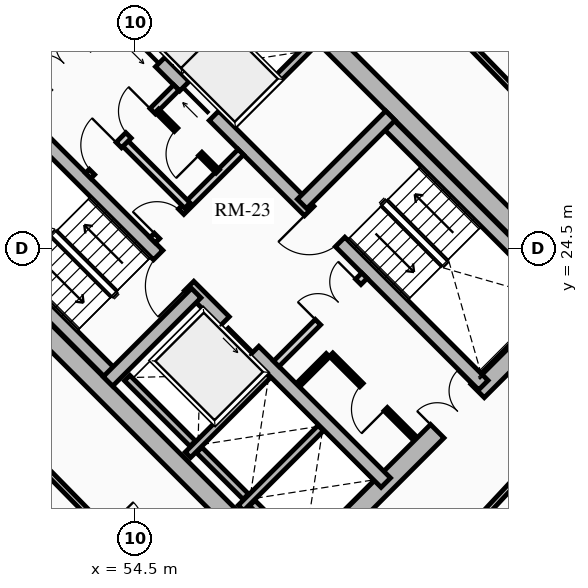
"""IFC4 building model, lengths in metres.
Left out: names, types, materials, properties, quantities, classifications, styles, units other than length and angle.
Written with IfcOpenShell. Run it as: python <this file> out.ifc"""

import sys

from ifc_helpers import new_model, si_unit, direction, frame, frame_2d, origin, place, context, subcontext, project, spatial, rectangle, extrude, source, transform, mapped, element, fill, save


model = new_model("IFC4")
c1 = context("Model", 3, precision=1e-05, world=origin(), true_north=direction((0.0, 1.0)))
c2 = subcontext(c1, "Body", "Model", "MODEL_VIEW")
j1 = project(units=[si_unit("LENGTHUNIT", "METRE"), si_unit("PLANEANGLEUNIT", "RADIAN")], contexts=[c1])
p1 = place(None, origin())
s1 = spatial("IfcSite", under=j1, at=p1, CompositionType="ELEMENT")
p2 = place(p1, origin())
s2 = spatial("IfcBuilding", under=s1, at=p2, CompositionType="ELEMENT")
p3 = place(p2, frame((0.0, 0.0, 62.74)))
s3 = spatial("IfcBuildingStorey", under=s2, at=p3, CompositionType="ELEMENT", Elevation=62.74)
for number, where, z_axis, x_axis in (
    (1, (58.773, 15.661, 0.0), (0.0, 0.0, 1.0), (-0.707, 0.707, 0.0)),
    (2, (66.339, 23.227, 0.0), (0.0, 0.0, 1.0), (-0.707, 0.707, 0.0)),
):
    element("IfcWall", number, at=place(p3, frame(where, z_axis=z_axis, x_axis=x_axis)), inside=s3, PredefinedType="SHEAR", context=c2, shape_type="SweptSolid", body=[
        extrude(rectangle(XDim=14.3, YDim=0.5, at=frame_2d((7.15, 0.0))), origin(), (0.0, 0.0, 1.0), 2.91),
    ])
p4 = place(p3, frame((58.596, 15.838, 0.0), z_axis=(0.0, 0.0, 1.0), x_axis=(0.707106781187, 0.707106781187, 0.0)))
e3 = element("IfcWall", 3, at=p4, inside=s3, PredefinedType="SHEAR", context=c2, shape_type="SweptSolid", body=[
    extrude(rectangle(XDim=10.7, YDim=0.5, at=frame_2d((5.35, 0.0))), origin(), (0.0, 0.0, 1.0), 2.91),
])
m1 = source(origin(), c2, "Body", "SweptSolid", [
    extrude(rectangle(XDim=1.5, YDim=2.02, at=frame_2d((0.75, 1.01))), frame((0.0, 0.26, 0.0), z_axis=(0.0, -1.0, 0.0), x_axis=(1.0, 0.0, 0.0)), (0.0, 0.0, 1.0), 0.52),
])
p5 = place(p4, frame((5.45, 0.0, 0.0)))
e4 = element("IfcOpeningElement", 4, at=p5, cuts=e3, PredefinedType="OPENING", context=c2, shape_type="MappedRepresentation", body=[
    mapped(m1, transform((0.0, 0.0, 0.0), x_axis=(1.0, 0.0, 0.0), y_axis=(0.0, 1.0, 0.0), z_axis=(0.0, 0.0, 1.0), scale=1.0)),
])
p6 = place(p3, frame((48.838, 25.596, 0.0), z_axis=(0.0, 0.0, 1.0), x_axis=(0.707106781187, 0.707106781187, 0.0)))
e5 = element("IfcWall", 5, at=p6, inside=s3, PredefinedType="SHEAR", context=c2, shape_type="SweptSolid", body=[
    extrude(rectangle(XDim=10.7, YDim=0.5, at=frame_2d((5.35, 0.0))), origin(), (0.0, 0.0, 1.0), 2.91),
])
p7 = place(p6, frame((4.6, 0.0, 0.0)))
e6 = element("IfcOpeningElement", 6, at=p7, cuts=e5, PredefinedType="OPENING", context=c2, shape_type="MappedRepresentation", body=[
    mapped(m1, transform((0.0, 0.0, 0.0), x_axis=(1.0, 0.0, 0.0), y_axis=(0.0, 1.0, 0.0), z_axis=(0.0, 0.0, 1.0), scale=1.0)),
])
p8 = place(p3, frame((61.096, 18.338, 0.0), z_axis=(0.0, 0.0, 1.0), x_axis=(-0.707106781187, 0.707106781187, 0.0)))
e7 = element("IfcWall", 7, at=p8, inside=s3, PredefinedType="SHEAR", context=c2, shape_type="SweptSolid", body=[
    extrude(rectangle(XDim=13.8, YDim=0.35, at=frame_2d((6.9, 0.0))), origin(), (0.0, 0.0, 1.0), 2.91),
])
m2 = source(origin(), c2, "Body", "SweptSolid", [
    extrude(rectangle(XDim=1.1, YDim=2.015, at=frame_2d((0.55, 1.007))), frame((0.0, 0.185, 0.0), z_axis=(0.0, -1.0, 0.0), x_axis=(1.0, 0.0, 0.0)), (0.0, 0.0, 1.0), 0.37),
])
p9 = place(p8, frame((4.9, 0.0, 0.0)))
e8 = element("IfcOpeningElement", 8, at=p9, cuts=e7, PredefinedType="OPENING", context=c2, shape_type="MappedRepresentation", body=[
    mapped(m2, transform((0.0, 0.0, 0.0), x_axis=(1.0, 0.0, 0.0), y_axis=(0.0, 1.0, 0.0), z_axis=(0.0, 0.0, 1.0), scale=1.0)),
])
m3 = source(origin(), c2, "Body", "SweptSolid", [
    extrude(rectangle(XDim=1.15, YDim=2.02, at=frame_2d((0.575, 1.01))), frame((0.0, 0.185, 0.0), z_axis=(0.0, -1.0, 0.0), x_axis=(1.0, 0.0, 0.0)), (0.0, 0.0, 1.0), 0.37),
])
p10 = place(p8, frame((7.32, 0.0, 0.0)))
e9 = element("IfcOpeningElement", 9, at=p10, cuts=e7, PredefinedType="OPENING", context=c2, shape_type="MappedRepresentation", body=[
    mapped(m3, transform((0.0, 0.0, 0.0), x_axis=(1.0, 0.0, 0.0), y_axis=(0.0, 1.0, 0.0), z_axis=(0.0, 0.0, 1.0), scale=1.0)),
])
p11 = place(p3, frame((63.662, 20.904, 0.0), z_axis=(0.0, 0.0, 1.0), x_axis=(-0.707106781187, 0.707106781187, 0.0)))
e10 = element("IfcWall", 10, at=p11, inside=s3, PredefinedType="SHEAR", context=c2, shape_type="SweptSolid", body=[
    extrude(rectangle(XDim=13.8, YDim=0.35, at=frame_2d((6.9, 0.0))), origin(), (0.0, 0.0, 1.0), 2.91),
])
p12 = place(p11, frame((10.025, 0.0, 0.0)))
e11 = element("IfcOpeningElement", 11, at=p12, cuts=e10, PredefinedType="OPENING", context=c2, shape_type="MappedRepresentation", body=[
    mapped(m2, transform((0.0, 0.0, 0.0), x_axis=(1.0, 0.0, 0.0), y_axis=(0.0, 1.0, 0.0), z_axis=(0.0, 0.0, 1.0), scale=1.0)),
])
p13 = place(p11, frame((12.025, 0.0, 0.0)))
e12 = element("IfcOpeningElement", 12, at=p13, cuts=e10, PredefinedType="OPENING", context=c2, shape_type="MappedRepresentation", body=[
    mapped(m2, transform((0.0, 0.0, 0.0), x_axis=(1.0, 0.0, 0.0), y_axis=(0.0, 1.0, 0.0), z_axis=(0.0, 0.0, 1.0), scale=1.0)),
])
p14 = place(p11, frame((5.33, 0.0, 0.0)))
e13 = element("IfcOpeningElement", 13, at=p14, cuts=e10, PredefinedType="OPENING", context=c2, shape_type="MappedRepresentation", body=[
    mapped(m3, transform((0.0, 0.0, 0.0), x_axis=(1.0, 0.0, 0.0), y_axis=(0.0, 1.0, 0.0), z_axis=(0.0, 0.0, 1.0), scale=1.0)),
])
p15 = place(p3, frame((53.922, 21.141, 0.0), z_axis=(0.0, 0.0, 1.0), x_axis=(-0.707106781187, 0.707106781187, 0.0)))
e14 = element("IfcWall", 14, at=p15, inside=s3, PredefinedType="SHEAR", context=c2, shape_type="SweptSolid", body=[
    extrude(rectangle(XDim=6.745, YDim=0.35, at=frame_2d((3.373, 0.0))), origin(), (0.0, 0.0, 1.0), 2.91),
])
p16 = place(p3, frame((53.784, 21.003, 0.0), z_axis=(0.0, 0.0, 1.0), x_axis=(0.707106781187, 0.707106781187, 0.0)))
e15 = element("IfcWall", 15, at=p16, inside=s3, PredefinedType="SHEAR", context=c2, shape_type="SweptSolid", body=[
    extrude(rectangle(XDim=3.285, YDim=0.35, at=frame_2d((1.643, 0.0))), origin(), (0.0, 0.0, 1.0), 2.91),
])
p17 = place(p3, frame((65.847, 23.089, 0.0), z_axis=(0.0, 0.0, 1.0), x_axis=(-0.707106781187, 0.707106781187, 0.0)))
e16 = element("IfcWall", 16, at=p17, inside=s3, PredefinedType="SHEAR", context=c2, shape_type="SweptSolid", body=[
    extrude(rectangle(XDim=6.745, YDim=0.35, at=frame_2d((3.373, 0.0))), origin(), (0.0, 0.0, 1.0), 2.91),
])
p18 = place(p3, frame((58.893, 25.674, 0.0), z_axis=(0.0, 0.0, 1.0), x_axis=(0.707106781187, 0.707106781187, 0.0)))
e17 = element("IfcWall", 17, at=p18, inside=s3, PredefinedType="SHEAR", context=c2, shape_type="SweptSolid", body=[
    extrude(rectangle(XDim=3.285, YDim=0.35, at=frame_2d((1.643, 0.0))), origin(), (0.0, 0.0, 1.0), 2.91),
])
p19 = place(p3, frame((55.888, 19.069, 0.0), z_axis=(0.0, 0.0, 1.0), x_axis=(0.707106781187, 0.707106781187, 0.0)))
e18 = element("IfcWall", 18, at=p19, inside=s3, PredefinedType="SHEAR", context=c2, shape_type="SweptSolid", body=[
    extrude(rectangle(XDim=2.97, YDim=0.2, at=frame_2d((1.485, 0.0))), origin(), (0.0, 0.0, 1.0), 2.91),
])
p20 = place(p3, frame((56.015, 19.366, 0.0), z_axis=(0.0, 0.0, 1.0), x_axis=(-0.707106781187, 0.707106781187, 0.0)))
e19 = element("IfcWall", 19, at=p20, inside=s3, PredefinedType="SHEAR", context=c2, shape_type="SweptSolid", body=[
    extrude(rectangle(XDim=2.44, YDim=0.2, at=frame_2d((1.22, 0.0))), origin(), (0.0, 0.0, 1.0), 2.91),
])
p21 = place(p3, frame((57.284, 17.673, 0.0), z_axis=(0.0, 0.0, 1.0), x_axis=(0.707147878904, 0.70706568108, 0.0)))
e20 = element("IfcWall", 20, at=p21, inside=s3, PredefinedType="SHEAR", context=c2, shape_type="SweptSolid", body=[
    extrude(rectangle(XDim=2.97, YDim=0.2, at=frame_2d((1.485, 0.0))), origin(), (0.0, 0.0, 1.0), 2.91),
])
p22 = place(p3, frame((57.412, 17.97, 0.0), z_axis=(0.0, 0.0, 1.0), x_axis=(-0.707106781187, 0.707106781187, 0.0)))
e21 = element("IfcWall", 21, at=p22, inside=s3, PredefinedType="SHEAR", context=c2, shape_type="SweptSolid", body=[
    extrude(rectangle(XDim=1.735, YDim=0.2, at=frame_2d((0.867, 0.0))), origin(), (0.0, 0.0, 1.0), 2.91),
])
p23 = place(p3, frame((58.737, 16.644, 0.0), z_axis=(0.0, 0.0, 1.0), x_axis=(-0.707032117043, 0.707181437447, 0.0)))
e22 = element("IfcWall", 22, at=p23, inside=s3, PredefinedType="SHEAR", context=c2, shape_type="SweptSolid", body=[
    extrude(rectangle(XDim=1.635, YDim=0.2, at=frame_2d((0.817, 0.0))), origin(), (0.0, 0.0, 1.0), 2.91),
])
p24 = place(p3, frame((57.062, 27.781, 0.0), z_axis=(0.0, 0.0, 1.0), x_axis=(0.707106781187, 0.707106781187, 0.0)))
e23 = element("IfcWall", 23, at=p24, inside=s3, PredefinedType="SHEAR", context=c2, shape_type="SweptSolid", body=[
    extrude(rectangle(XDim=2.97, YDim=0.2, at=frame_2d((1.485, 0.0))), origin(), (0.0, 0.0, 1.0), 2.91),
])
p25 = place(p3, frame((55.615, 29.227, 0.0), z_axis=(0.0, 0.0, 1.0), x_axis=(0.707147878904, 0.70706568108, 0.0)))
e24 = element("IfcWall", 24, at=p25, inside=s3, PredefinedType="SHEAR", context=c2, shape_type="SweptSolid", body=[
    extrude(rectangle(XDim=2.97, YDim=0.2, at=frame_2d((1.485, 0.0))), origin(), (0.0, 0.0, 1.0), 2.91),
])
p26 = place(p3, frame((58.214, 21.467, 0.0), z_axis=(0.0, 0.0, 1.0), x_axis=(0.707106781187, 0.707106781187, 0.0)))
e25 = element("IfcWall", 25, at=p26, inside=s3, PredefinedType="PARTITIONING", context=c2, shape_type="SweptSolid", body=[
    extrude(rectangle(XDim=3.28, YDim=0.2, at=frame_2d((1.64, 0.0))), origin(), (0.0, 0.0, 1.0), 2.555),
])
m4 = source(origin(), c2, "Body", "SweptSolid", [
    extrude(rectangle(XDim=1.5, YDim=2.02, at=frame_2d((0.75, 1.01))), frame((0.0, 0.11, 0.0), z_axis=(0.0, -1.0, 0.0), x_axis=(1.0, 0.0, 0.0)), (0.0, 0.0, 1.0), 0.22),
])
p27 = place(p26, frame((1.55, 0.0, 0.0)))
e26 = element("IfcOpeningElement", 26, at=p27, cuts=e25, PredefinedType="OPENING", context=c2, shape_type="MappedRepresentation", body=[
    mapped(m4, transform((0.0, 0.0, 0.0), x_axis=(1.0, 0.0, 0.0), y_axis=(0.0, 1.0, 0.0), z_axis=(0.0, 0.0, 1.0), scale=1.0)),
])
p28 = place(p3, frame((54.961, 24.719, 0.0), z_axis=(0.0, 0.0, 1.0), x_axis=(0.707106781187, 0.707106781187, 0.0)))
e27 = element("IfcWall", 27, at=p28, inside=s3, PredefinedType="PARTITIONING", context=c2, shape_type="SweptSolid", body=[
    extrude(rectangle(XDim=3.28, YDim=0.2, at=frame_2d((1.64, 0.0))), origin(), (0.0, 0.0, 1.0), 2.555),
])
m5 = source(origin(), c2, "Body", "SweptSolid", [
    extrude(rectangle(XDim=0.9, YDim=2.005, at=frame_2d((0.45, 1.002))), frame((0.0, 0.11, 0.0), z_axis=(0.0, -1.0, 0.0), x_axis=(1.0, 0.0, 0.0)), (0.0, 0.0, 1.0), 0.22),
])
p29 = place(p28, frame((0.16, 0.0, 0.0)))
e28 = element("IfcOpeningElement", 28, at=p29, cuts=e27, PredefinedType="OPENING", context=c2, shape_type="MappedRepresentation", body=[
    mapped(m5, transform((0.0, 0.0, 0.0), x_axis=(1.0, 0.0, 0.0), y_axis=(0.0, 1.0, 0.0), z_axis=(0.0, 0.0, 1.0), scale=1.0)),
])
p30 = place(p3, frame((55.874, 25.631, 0.0), z_axis=(0.0, 0.0, 1.0), x_axis=(-0.707157639372, 0.707055919343, 0.0)))
e29 = element("IfcWall", 29, at=p30, inside=s3, PredefinedType="PARTITIONING", context=c2, shape_type="SweptSolid", body=[
    extrude(rectangle(XDim=2.4, YDim=0.2, at=frame_2d((1.2, 0.0))), origin(), (0.0, 0.0, 1.0), 2.555),
])
p31 = place(p3, frame((53.264, 26.416, 0.0), z_axis=(0.0, 0.0, 1.0), x_axis=(0.707106781187, 0.707106781187, 0.0)))
e30 = element("IfcWall", 30, at=p31, inside=s3, PredefinedType="PARTITIONING", context=c2, shape_type="SweptSolid", body=[
    extrude(rectangle(XDim=3.28, YDim=0.2, at=frame_2d((1.64, 0.0))), origin(), (0.0, 0.0, 1.0), 2.555),
])
m6 = source(origin(), c2, "Body", "SweptSolid", [
    extrude(rectangle(XDim=1.0, YDim=2.015, at=frame_2d((0.5, 1.007))), frame((0.0, 0.11, 0.0), z_axis=(0.0, -1.0, 0.0), x_axis=(1.0, 0.0, 0.0)), (0.0, 0.0, 1.0), 0.22),
])
p32 = place(p31, frame((0.14, 0.0, 0.0)))
e31 = element("IfcOpeningElement", 31, at=p32, cuts=e30, PredefinedType="OPENING", context=c2, shape_type="MappedRepresentation", body=[
    mapped(m6, transform((0.0, 0.0, 0.0), x_axis=(1.0, 0.0, 0.0), y_axis=(0.0, 1.0, 0.0), z_axis=(0.0, 0.0, 1.0), scale=1.0)),
])
p33 = place(p31, frame((1.5, 0.0, 0.0)))
e32 = element("IfcOpeningElement", 32, at=p33, cuts=e30, PredefinedType="OPENING", context=c2, shape_type="MappedRepresentation", body=[
    mapped(m5, transform((0.0, 0.0, 0.0), x_axis=(1.0, 0.0, 0.0), y_axis=(0.0, 1.0, 0.0), z_axis=(0.0, 0.0, 1.0), scale=1.0)),
])
p34 = place(p3, frame((61.835, 19.529, 0.0), z_axis=(0.0, 0.0, 1.0), x_axis=(-0.707146413884, 0.707067146267, 0.0)))
e33 = element("IfcWall", 33, at=p34, inside=s3, PredefinedType="PARTITIONING", context=c2, shape_type="SweptSolid", body=[
    extrude(rectangle(XDim=3.08, YDim=0.125, at=frame_2d((1.54, 0.0))), origin(), (0.0, 0.0, 1.0), 2.555),
])
m7 = source(origin(), c2, "Body", "SweptSolid", [
    extrude(rectangle(XDim=0.9, YDim=2.005, at=frame_2d((0.45, 1.002))), frame((0.0, 0.073, 0.0), z_axis=(0.0, -1.0, 0.0), x_axis=(1.0, 0.0, 0.0)), (0.0, 0.0, 1.0), 0.145),
])
p35 = place(p34, frame((1.05, 0.0, 0.0)))
e34 = element("IfcOpeningElement", 34, at=p35, cuts=e33, PredefinedType="OPENING", context=c2, shape_type="MappedRepresentation", body=[
    mapped(m7, transform((0.0, 0.0, 0.0), x_axis=(1.0, 0.0, 0.0), y_axis=(0.0, 1.0, 0.0), z_axis=(0.0, 0.0, 1.0), scale=1.0)),
])
p36 = place(p3, frame((58.794, 20.915, 0.0), z_axis=(0.0, 0.0, 1.0), x_axis=(0.707106781187, 0.707106781187, 0.0)))
e35 = element("IfcWall", 35, at=p36, inside=s3, PredefinedType="PARTITIONING", context=c2, shape_type="SweptSolid", body=[
    extrude(rectangle(XDim=1.1, YDim=0.125, at=frame_2d((0.55, 0.0))), origin(), (0.0, 0.0, 1.0), 2.555),
])
p37 = place(p3, frame((56.673, 26.529, 0.0), z_axis=(0.0, 0.0, 1.0), x_axis=(-0.707052764397, 0.70716079385, 0.0)))
e36 = element("IfcWall", 36, at=p37, inside=s3, PredefinedType="PARTITIONING", context=c2, shape_type="SweptSolid", body=[
    extrude(rectangle(XDim=2.26, YDim=0.125, at=frame_2d((1.13, 0.0))), origin(), (0.0, 0.0, 1.0), 2.555),
])
p38 = place(p37, frame((0.65, 0.0, 0.0)))
e37 = element("IfcOpeningElement", 37, at=p38, cuts=e36, PredefinedType="OPENING", context=c2, shape_type="MappedRepresentation", body=[
    mapped(m7, transform((0.0, 0.0, 0.0), x_axis=(1.0, 0.0, 0.0), y_axis=(0.0, 1.0, 0.0), z_axis=(0.0, 0.0, 1.0), scale=1.0)),
])
p39 = place(p3, frame((51.914, 18.914, 0.0), z_axis=(0.0, 0.0, 1.0), x_axis=(0.699999313799, -0.714143515465, 0.0)))
e38 = element("IfcWall", 38, at=p39, inside=s3, PredefinedType="PARTITIONING", context=c2, shape_type="SweptSolid", body=[
    extrude(rectangle(XDim=6.162, YDim=0.15, at=frame_2d((3.081, 0.0))), origin(), (0.0, 0.0, 1.0), 2.079),
])
m8 = source(origin(), c2, "Body", "SweptSolid", [
    extrude(rectangle(XDim=1.05, YDim=2.015, at=frame_2d((0.525, 1.007))), frame((0.0, 0.085, 0.0), z_axis=(0.0, -1.0, 0.0), x_axis=(1.0, 0.0, 0.0)), (0.0, 0.0, 1.0), 0.17),
])
p40 = place(p39, frame((2.556, 0.0, 0.0)))
e39 = element("IfcOpeningElement", 39, at=p40, cuts=e38, PredefinedType="OPENING", context=c2, shape_type="MappedRepresentation", body=[
    mapped(m8, transform((0.0, 0.0, 0.0), x_axis=(1.0, 0.0, 0.0), y_axis=(0.0, 1.0, 0.0), z_axis=(0.0, 0.0, 1.0), scale=1.0)),
])
p41 = place(p3, frame((62.903, 16.667, 0.0), z_axis=(0.0, 0.0, 1.0), x_axis=(0.682371947497, 0.731005147225, 0.0)))
e40 = element("IfcWall", 40, at=p41, inside=s3, PredefinedType="PARTITIONING", context=c2, shape_type="SweptSolid", body=[
    extrude(rectangle(XDim=6.642, YDim=0.15, at=frame_2d((3.321, 0.0))), origin(), (0.0, 0.0, 1.0), 2.079),
])
p42 = place(p3, frame((67.27, 25.78, 0.0), z_axis=(0.0, 0.0, 1.0), x_axis=(-0.696847842907, 0.717218992942, 0.0)))
e41 = element("IfcWall", 41, at=p42, inside=s3, PredefinedType="PARTITIONING", context=c2, shape_type="SweptSolid", body=[
    extrude(rectangle(XDim=6.004, YDim=0.15, at=frame_2d((3.002, 0.0))), origin(), (0.0, 0.0, 1.0), 2.555),
])
m9 = source(origin(), c2, "Body", "SweptSolid", [
    extrude(rectangle(XDim=1.0, YDim=2.015, at=frame_2d((0.5, 1.007))), frame((0.0, 0.085, 0.0), z_axis=(0.0, -1.0, 0.0), x_axis=(1.0, 0.0, 0.0)), (0.0, 0.0, 1.0), 0.17),
])
p43 = place(p42, frame((2.502, 0.0, 0.0)))
e42 = element("IfcOpeningElement", 42, at=p43, cuts=e41, PredefinedType="OPENING", context=c2, shape_type="MappedRepresentation", body=[
    mapped(m9, transform((0.0, 0.0, 0.0), x_axis=(1.0, 0.0, 0.0), y_axis=(0.0, 1.0, 0.0), z_axis=(0.0, 0.0, 1.0), scale=1.0)),
])
m10 = source(origin(), c2, "Body", "SweptSolid", [
    extrude(rectangle(XDim=1.1, YDim=2.015, at=frame_2d((0.55, 1.007))), frame((0.0, 0.025, 0.0), z_axis=(0.0, -1.0, 0.0), x_axis=(1.0, 0.0, 0.0)), (0.0, 0.0, 1.0), 0.05),
])
p44 = place(p9, origin())
e43 = element("IfcDoor", 43, at=p44, inside=s3, OperationType="SLIDING_TO_LEFT", PredefinedType="DOOR", context=c2, shape_type="MappedRepresentation", body=[
    mapped(m10, transform((0.0, 0.0, 0.0), x_axis=(1.0, 0.0, 0.0), y_axis=(0.0, 1.0, 0.0), z_axis=(0.0, 0.0, 1.0), scale=1.0)),
])
fill(e8, e43)
p45 = place(p12, origin())
e44 = element("IfcDoor", 44, at=p45, inside=s3, OperationType="SLIDING_TO_RIGHT", PredefinedType="DOOR", context=c2, shape_type="MappedRepresentation", body=[
    mapped(m10, transform((0.0, 0.0, 0.0), x_axis=(1.0, 0.0, 0.0), y_axis=(0.0, 1.0, 0.0), z_axis=(0.0, 0.0, 1.0), scale=1.0)),
])
fill(e11, e44)
p46 = place(p13, origin())
e45 = element("IfcDoor", 45, at=p46, inside=s3, OperationType="SLIDING_TO_LEFT", PredefinedType="DOOR", context=c2, shape_type="MappedRepresentation", body=[
    mapped(m10, transform((0.0, 0.0, 0.0), x_axis=(1.0, 0.0, 0.0), y_axis=(0.0, 1.0, 0.0), z_axis=(0.0, 0.0, 1.0), scale=1.0)),
])
fill(e12, e45)
m11 = source(origin(), c2, "Body", "SweptSolid", [
    extrude(rectangle(XDim=1.15, YDim=2.02, at=frame_2d((0.575, 1.01))), frame((0.0, 0.025, 0.0), z_axis=(0.0, -1.0, 0.0), x_axis=(1.0, 0.0, 0.0)), (0.0, 0.0, 1.0), 0.05),
])
p47 = place(p10, origin())
e46 = element("IfcDoor", 46, at=p47, inside=s3, OperationType="SINGLE_SWING_LEFT", PredefinedType="DOOR", context=c2, shape_type="MappedRepresentation", body=[
    mapped(m11, transform((0.0, 0.0, 0.0), x_axis=(1.0, 0.0, 0.0), y_axis=(0.0, 1.0, 0.0), z_axis=(0.0, 0.0, 1.0), scale=1.0)),
])
fill(e9, e46)
p48 = place(p14, origin())
e47 = element("IfcDoor", 47, at=p48, inside=s3, OperationType="SINGLE_SWING_RIGHT", PredefinedType="DOOR", context=c2, shape_type="MappedRepresentation", body=[
    mapped(m11, transform((0.0, 0.0, 0.0), x_axis=(1.0, 0.0, 0.0), y_axis=(0.0, 1.0, 0.0), z_axis=(0.0, 0.0, 1.0), scale=1.0)),
])
fill(e13, e47)
m12 = source(origin(), c2, "Body", "SweptSolid", [
    extrude(rectangle(XDim=1.5, YDim=2.02, at=frame_2d((0.75, 1.01))), frame((0.0, 0.025, 0.0), z_axis=(0.0, -1.0, 0.0), x_axis=(1.0, 0.0, 0.0)), (0.0, 0.0, 1.0), 0.05),
])
p49 = place(p7, origin())
e48 = element("IfcDoor", 48, at=p49, inside=s3, OperationType="DOUBLE_DOOR_SINGLE_SWING", PredefinedType="DOOR", context=c2, shape_type="MappedRepresentation", body=[
    mapped(m12, transform((0.0, 0.0, 0.0), x_axis=(1.0, 0.0, 0.0), y_axis=(0.0, 1.0, 0.0), z_axis=(0.0, 0.0, 1.0), scale=1.0)),
])
fill(e6, e48)
p50 = place(p5, origin())
e49 = element("IfcDoor", 49, at=p50, inside=s3, OperationType="DOUBLE_DOOR_SINGLE_SWING", PredefinedType="DOOR", context=c2, shape_type="MappedRepresentation", body=[
    mapped(m12, transform((0.0, 0.0, 0.0), x_axis=(1.0, 0.0, 0.0), y_axis=(0.0, 1.0, 0.0), z_axis=(0.0, 0.0, 1.0), scale=1.0)),
])
fill(e4, e49)
p51 = place(p27, origin())
e50 = element("IfcDoor", 50, at=p51, inside=s3, OperationType="DOUBLE_DOOR_SINGLE_SWING", PredefinedType="DOOR", context=c2, shape_type="MappedRepresentation", body=[
    mapped(m12, transform((0.0, 0.0, 0.0), x_axis=(1.0, 0.0, 0.0), y_axis=(0.0, 1.0, 0.0), z_axis=(0.0, 0.0, 1.0), scale=1.0)),
])
fill(e26, e50)
m13 = source(origin(), c2, "Body", "SweptSolid", [
    extrude(rectangle(XDim=0.9, YDim=2.005, at=frame_2d((0.45, 1.002))), frame((0.0, 0.025, 0.0), z_axis=(0.0, -1.0, 0.0), x_axis=(1.0, 0.0, 0.0)), (0.0, 0.0, 1.0), 0.05),
])
p52 = place(p29, origin())
e51 = element("IfcDoor", 51, at=p52, inside=s3, OperationType="SINGLE_SWING_LEFT", PredefinedType="DOOR", context=c2, shape_type="MappedRepresentation", body=[
    mapped(m13, transform((0.0, 0.0, 0.0), x_axis=(1.0, 0.0, 0.0), y_axis=(0.0, 1.0, 0.0), z_axis=(0.0, 0.0, 1.0), scale=1.0)),
])
fill(e28, e51)
m14 = source(origin(), c2, "Body", "SweptSolid", [
    extrude(rectangle(XDim=1.0, YDim=2.015, at=frame_2d((0.5, 1.007))), frame((0.0, 0.025, 0.0), z_axis=(0.0, -1.0, 0.0), x_axis=(1.0, 0.0, 0.0)), (0.0, 0.0, 1.0), 0.05),
])
p53 = place(p32, origin())
e52 = element("IfcDoor", 52, at=p53, inside=s3, OperationType="SINGLE_SWING_RIGHT", PredefinedType="DOOR", context=c2, shape_type="MappedRepresentation", body=[
    mapped(m14, transform((0.0, 0.0, 0.0), x_axis=(1.0, 0.0, 0.0), y_axis=(0.0, 1.0, 0.0), z_axis=(0.0, 0.0, 1.0), scale=1.0)),
])
fill(e31, e52)
p54 = place(p35, origin())
e53 = element("IfcDoor", 53, at=p54, inside=s3, OperationType="SINGLE_SWING_LEFT", PredefinedType="DOOR", context=c2, shape_type="MappedRepresentation", body=[
    mapped(m13, transform((0.0, 0.0, 0.0), x_axis=(1.0, 0.0, 0.0), y_axis=(0.0, 1.0, 0.0), z_axis=(0.0, 0.0, 1.0), scale=1.0)),
])
fill(e34, e53)
p55 = place(p33, origin())
e54 = element("IfcDoor", 54, at=p55, inside=s3, OperationType="SINGLE_SWING_RIGHT", PredefinedType="DOOR", context=c2, shape_type="MappedRepresentation", body=[
    mapped(m13, transform((0.0, 0.0, 0.0), x_axis=(1.0, 0.0, 0.0), y_axis=(0.0, 1.0, 0.0), z_axis=(0.0, 0.0, 1.0), scale=1.0)),
])
fill(e32, e54)
p56 = place(p38, origin())
e55 = element("IfcDoor", 55, at=p56, inside=s3, OperationType="SINGLE_SWING_LEFT", PredefinedType="DOOR", context=c2, shape_type="MappedRepresentation", body=[
    mapped(m13, transform((0.0, 0.0, 0.0), x_axis=(1.0, 0.0, 0.0), y_axis=(0.0, 1.0, 0.0), z_axis=(0.0, 0.0, 1.0), scale=1.0)),
])
fill(e37, e55)
save(model, sys.argv[1])
